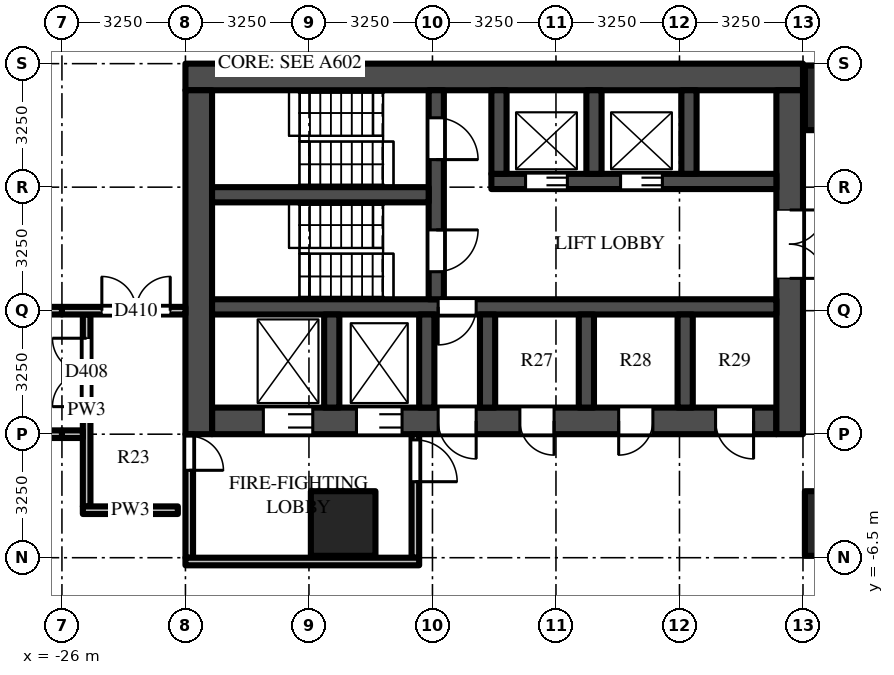
"""IFC4 building model, lengths in metres.
Left out: names, types, materials, properties, quantities, classifications, styles, units other than length and angle.
Written with IfcOpenShell. Run it as: python <this file> out.ifc"""

import sys

from ifc_helpers import new_model, si_unit, direction, frame, frame_2d, origin, origin_2d, place, context, subcontext, project, spatial, rectangle, extrude, source, transform, mapped, element, fill, save


model = new_model("IFC4")
c1 = context("Model", 3, precision=1e-05, world=origin(), true_north=direction((0.0, 1.0)))
c2 = subcontext(c1, "Body", "Model", "MODEL_VIEW")
j1 = project(units=[si_unit("LENGTHUNIT", "METRE"), si_unit("PLANEANGLEUNIT", "RADIAN")], contexts=[c1])
p1 = place(None, origin())
s1 = spatial("IfcSite", under=j1, at=p1, CompositionType="ELEMENT")
p2 = place(p1, origin())
s2 = spatial("IfcBuilding", under=s1, at=p2, CompositionType="ELEMENT")
p3 = place(p2, frame((0.0, 0.0, 8.0)))
s3 = spatial("IfcBuildingStorey", under=s2, at=p3, CompositionType="ELEMENT", Elevation=8.0)
m1 = source(origin(), c2, "Body", "SweptSolid", [
    extrude(rectangle(XDim=1.7, YDim=1.7, at=origin_2d()), origin(), (0.0, 0.0, 1.0), 6.0),
])
for number, where, z_axis, x_axis in (
    (1, (-5.6, 5.6, 0.0), (0.0, 0.0, 1.0), (1.0, 0.0, 0.0)),
    (2, (-5.6, -5.6, 0.0), (0.0, 0.0, 1.0), (1.0, 0.0, 0.0)),
    (3, (-18.6, -5.6, 0.0), (0.0, 0.0, 1.0), (1.0, 0.0, 0.0)),
):
    element("IfcColumn", number, at=place(p3, frame(where, z_axis=z_axis, x_axis=x_axis)), inside=s3, PredefinedType="COLUMN", context=c2, shape_type="MappedRepresentation", body=[
        mapped(m1, transform((0.0, 0.0, 0.0))),
    ])
m2 = source(origin(), c2, "Body", "SweptSolid", [
    extrude(rectangle(XDim=16.25, YDim=0.7, at=frame_2d((8.125, 0.0))), origin(), (0.0, 0.0, 1.0), 5.7),
])
p4 = place(p3, frame((-6.5, 6.15, 0.0), z_axis=(0.0, 0.0, 1.0), x_axis=(-1.0, 0.0, 0.0)))
e4 = element("IfcWall", 4, at=p4, inside=s3, PredefinedType="SHEAR", context=c2, shape_type="MappedRepresentation", body=[
    mapped(m2, transform((0.0, 0.0, 0.0))),
])
m3 = source(origin(), c2, "Body", "SweptSolid", [
    extrude(rectangle(XDim=14.85, YDim=0.7, at=frame_2d((7.425, 0.0))), origin(), (0.0, 0.0, 1.0), 5.7),
])
p5 = place(p3, frame((-7.2, -2.9, 0.0), z_axis=(0.0, 0.0, 1.0), x_axis=(-1.0, 0.0, 0.0)))
e5 = element("IfcWall", 5, at=p5, inside=s3, PredefinedType="SHEAR", context=c2, shape_type="MappedRepresentation", body=[
    mapped(m3, transform((0.0, 0.0, 0.0))),
])
m4 = source(origin(), c2, "Body", "SweptSolid", [
    extrude(rectangle(XDim=1.3, YDim=2.1, at=frame_2d((0.65, 1.05))), frame((0.0, 0.36, 0.0), z_axis=(0.0, -1.0, 0.0), x_axis=(1.0, 0.0, 0.0)), (0.0, 0.0, 1.0), 0.72),
])
p6 = place(p5, frame((12.2, 0.0, 0.0)))
e6 = element("IfcOpeningElement", 6, at=p6, cuts=e5, PredefinedType="OPENING", context=c2, shape_type="MappedRepresentation", body=[
    mapped(m4, transform((0.0, 0.0, 0.0))),
])
m5 = source(origin(), c2, "Body", "SweptSolid", [
    extrude(rectangle(XDim=1.2, YDim=2.1, at=frame_2d((0.6, 1.05))), frame((0.0, 0.36, 0.0), z_axis=(0.0, -1.0, 0.0), x_axis=(1.0, 0.0, 0.0)), (0.0, 0.0, 1.0), 0.72),
])
p7 = place(p5, frame((9.85, 0.0, 0.0)))
e7 = element("IfcOpeningElement", 7, at=p7, cuts=e5, PredefinedType="OPENING", context=c2, shape_type="MappedRepresentation", body=[
    mapped(m5, transform((0.0, 0.0, 0.0))),
])
m6 = source(origin(), c2, "Body", "SweptSolid", [
    extrude(rectangle(XDim=1.0, YDim=2.1, at=frame_2d((0.5, 1.05))), frame((0.0, 0.36, 0.0), z_axis=(0.0, -1.0, 0.0), x_axis=(1.0, 0.0, 0.0)), (0.0, 0.0, 1.0), 0.72),
])
p8 = place(p5, frame((7.9, 0.0, 0.0)))
e8 = element("IfcOpeningElement", 8, at=p8, cuts=e5, PredefinedType="OPENING", context=c2, shape_type="MappedRepresentation", body=[
    mapped(m6, transform((0.0, 0.0, 0.0))),
])
p9 = place(p5, frame((0.6, 0.0, 0.0)))
e9 = element("IfcOpeningElement", 9, at=p9, cuts=e5, PredefinedType="OPENING", context=c2, shape_type="MappedRepresentation", body=[
    mapped(m6, transform((0.0, 0.0, 0.0))),
])
m7 = source(origin(), c2, "Body", "SweptSolid", [
    extrude(rectangle(XDim=0.9, YDim=2.1, at=frame_2d((0.45, 1.05))), frame((0.0, 0.36, 0.0), z_axis=(0.0, -1.0, 0.0), x_axis=(1.0, 0.0, 0.0)), (0.0, 0.0, 1.0), 0.72),
])
p10 = place(p5, frame((3.25, 0.0, 0.0)))
e10 = element("IfcOpeningElement", 10, at=p10, cuts=e5, PredefinedType="OPENING", context=c2, shape_type="MappedRepresentation", body=[
    mapped(m7, transform((0.0, 0.0, 0.0))),
])
p11 = place(p5, frame((5.85, 0.0, 0.0)))
e11 = element("IfcOpeningElement", 11, at=p11, cuts=e5, PredefinedType="OPENING", context=c2, shape_type="MappedRepresentation", body=[
    mapped(m7, transform((0.0, 0.0, 0.0))),
])
m8 = source(origin(), c2, "Body", "SweptSolid", [
    extrude(rectangle(XDim=9.05, YDim=0.7, at=frame_2d((4.525, 0.0))), origin(), (0.0, 0.0, 1.0), 5.7),
])
p12 = place(p3, frame((-6.85, 5.8, 0.0), z_axis=(0.0, 0.0, 1.0), x_axis=(0.0, -1.0, 0.0)))
e12 = element("IfcWall", 12, at=p12, inside=s3, PredefinedType="SHEAR", context=c2, shape_type="MappedRepresentation", body=[
    mapped(m8, transform((0.0, 0.0, 0.0))),
])
m9 = source(origin(), c2, "Body", "SweptSolid", [
    extrude(rectangle(XDim=1.8, YDim=2.1, at=frame_2d((0.9, 1.05))), frame((0.0, 0.36, 0.0), z_axis=(0.0, -1.0, 0.0), x_axis=(1.0, 0.0, 0.0)), (0.0, 0.0, 1.0), 0.72),
])
p13 = place(p12, frame((3.15, 0.0, 0.0)))
e13 = element("IfcOpeningElement", 13, at=p13, cuts=e12, PredefinedType="OPENING", context=c2, shape_type="MappedRepresentation", body=[
    mapped(m9, transform((0.0, 0.0, 0.0))),
])
p14 = place(p3, frame((-22.4, 5.8, 0.0), z_axis=(0.0, 0.0, 1.0), x_axis=(0.0, -1.0, 0.0)))
e14 = element("IfcWall", 14, at=p14, inside=s3, PredefinedType="SHEAR", context=c2, shape_type="MappedRepresentation", body=[
    mapped(m8, transform((0.0, 0.0, 0.0))),
])
m10 = source(origin(), c2, "Body", "SweptSolid", [
    extrude(rectangle(XDim=7.5, YDim=0.4, at=frame_2d((3.75, 0.0))), origin(), (0.0, 0.0, 1.0), 5.7),
])
p15 = place(p3, frame((-7.2, 3.4, 0.0), z_axis=(0.0, 0.0, 1.0), x_axis=(-1.0, 0.0, 0.0)))
e15 = element("IfcWall", 15, at=p15, inside=s3, PredefinedType="SHEAR", context=c2, shape_type="MappedRepresentation", body=[
    mapped(m10, transform((0.0, 0.0, 0.0))),
])
m11 = source(origin(), c2, "Body", "SweptSolid", [
    extrude(rectangle(XDim=1.1, YDim=2.1, at=frame_2d((0.55, 1.05))), frame((0.0, 0.21, 0.0), z_axis=(0.0, -1.0, 0.0), x_axis=(1.0, 0.0, 0.0)), (0.0, 0.0, 1.0), 0.42),
])
p16 = place(p15, frame((3.0, 0.0, 0.0)))
e16 = element("IfcOpeningElement", 16, at=p16, cuts=e15, PredefinedType="OPENING", context=c2, shape_type="MappedRepresentation", body=[
    mapped(m11, transform((0.0, 0.0, 0.0))),
])
p17 = place(p15, frame((5.5, 0.0, 0.0)))
e17 = element("IfcOpeningElement", 17, at=p17, cuts=e15, PredefinedType="OPENING", context=c2, shape_type="MappedRepresentation", body=[
    mapped(m11, transform((0.0, 0.0, 0.0))),
])
m12 = source(origin(), c2, "Body", "SweptSolid", [
    extrude(rectangle(XDim=14.85, YDim=0.4, at=frame_2d((7.425, 0.0))), origin(), (0.0, 0.0, 1.0), 5.7),
])
p18 = place(p3, frame((-7.2, 0.1, 0.0), z_axis=(0.0, 0.0, 1.0), x_axis=(-1.0, 0.0, 0.0)))
e18 = element("IfcWall", 18, at=p18, inside=s3, PredefinedType="SHEAR", context=c2, shape_type="MappedRepresentation", body=[
    mapped(m12, transform((0.0, 0.0, 0.0))),
])
m13 = source(origin(), c2, "Body", "SweptSolid", [
    extrude(rectangle(XDim=1.0, YDim=2.1, at=frame_2d((0.5, 1.05))), frame((0.0, 0.21, 0.0), z_axis=(0.0, -1.0, 0.0), x_axis=(1.0, 0.0, 0.0)), (0.0, 0.0, 1.0), 0.42),
])
p19 = place(p18, frame((7.9, 0.0, 0.0)))
e19 = element("IfcOpeningElement", 19, at=p19, cuts=e18, PredefinedType="OPENING", context=c2, shape_type="MappedRepresentation", body=[
    mapped(m13, transform((0.0, 0.0, 0.0))),
])
m14 = source(origin(), c2, "Body", "SweptSolid", [
    extrude(rectangle(XDim=5.5, YDim=0.4, at=frame_2d((2.75, 0.0))), origin(), (0.0, 0.0, 1.0), 5.7),
])
p20 = place(p3, frame((-16.15, 5.8, 0.0), z_axis=(0.0, 0.0, 1.0), x_axis=(0.0, -1.0, 0.0)))
e20 = element("IfcWall", 20, at=p20, inside=s3, PredefinedType="SHEAR", context=c2, shape_type="MappedRepresentation", body=[
    mapped(m14, transform((0.0, 0.0, 0.0))),
])
p21 = place(p20, frame((0.725, 0.0, 0.0)))
e21 = element("IfcOpeningElement", 21, at=p21, cuts=e20, PredefinedType="OPENING", context=c2, shape_type="MappedRepresentation", body=[
    mapped(m11, transform((0.0, 0.0, 0.0))),
])
p22 = place(p20, frame((3.675, 0.0, 0.0)))
e22 = element("IfcOpeningElement", 22, at=p22, cuts=e20, PredefinedType="OPENING", context=c2, shape_type="MappedRepresentation", body=[
    mapped(m11, transform((0.0, 0.0, 0.0))),
])
m15 = source(origin(), c2, "Body", "SweptSolid", [
    extrude(rectangle(XDim=5.7, YDim=0.4, at=frame_2d((2.85, 0.0))), origin(), (0.0, 0.0, 1.0), 5.7),
])
p23 = place(p3, frame((-16.35, 3.05, 0.0), z_axis=(0.0, 0.0, 1.0), x_axis=(-1.0, 0.0, 0.0)))
e23 = element("IfcWall", 23, at=p23, inside=s3, PredefinedType="SHEAR", context=c2, shape_type="MappedRepresentation", body=[
    mapped(m15, transform((0.0, 0.0, 0.0))),
])
m16 = source(origin(), c2, "Body", "SweptSolid", [
    extrude(rectangle(XDim=2.2, YDim=0.4, at=frame_2d((1.1, 0.0))), origin(), (0.0, 0.0, 1.0), 5.7),
])
for number, where, z_axis, x_axis in (
    (24, (-9.5, 5.8, 0.0), (0.0, 0.0, 1.0), (0.0, -1.0, 0.0)),
    (25, (-12.0, 5.8, 0.0), (0.0, 0.0, 1.0), (0.0, -1.0, 0.0)),
    (26, (-14.5, 5.8, 0.0), (0.0, 0.0, 1.0), (0.0, -1.0, 0.0)),
):
    element("IfcWall", number, at=place(p3, frame(where, z_axis=z_axis, x_axis=x_axis)), inside=s3, PredefinedType="SHEAR", context=c2, shape_type="MappedRepresentation", body=[
        mapped(m16, transform((0.0, 0.0, 0.0))),
    ])
m17 = source(origin(), c2, "Body", "SweptSolid", [
    extrude(rectangle(XDim=2.45, YDim=0.4, at=frame_2d((1.225, 0.0))), origin(), (0.0, 0.0, 1.0), 5.7),
])
for number, where, z_axis, x_axis in (
    (27, (-9.6, -0.1, 0.0), (0.0, 0.0, 1.0), (0.0, -1.0, 0.0)),
    (28, (-12.2, -0.1, 0.0), (0.0, 0.0, 1.0), (0.0, -1.0, 0.0)),
    (29, (-14.8, -0.1, 0.0), (0.0, 0.0, 1.0), (0.0, -1.0, 0.0)),
    (30, (-16.4, -0.1, 0.0), (0.0, 0.0, 1.0), (0.0, -1.0, 0.0)),
    (31, (-18.9, -0.1, 0.0), (0.0, 0.0, 1.0), (0.0, -1.0, 0.0)),
):
    element("IfcWall", number, at=place(p3, frame(where, z_axis=z_axis, x_axis=x_axis)), inside=s3, PredefinedType="SHEAR", context=c2, shape_type="MappedRepresentation", body=[
        mapped(m17, transform((0.0, 0.0, 0.0))),
    ])
m18 = source(origin(), c2, "Body", "SweptSolid", [
    extrude(rectangle(XDim=3.25, YDim=0.2, at=frame_2d((1.625, 0.0))), origin(), (0.0, 0.0, 1.0), 5.7),
])
p24 = place(p3, frame((-16.7, -3.25, 0.0), z_axis=(0.0, 0.0, 1.0), x_axis=(0.0, -1.0, 0.0)))
e32 = element("IfcWall", 32, at=p24, inside=s3, PredefinedType="PARTITIONING", context=c2, shape_type="MappedRepresentation", body=[
    mapped(m18, transform((0.0, 0.0, 0.0))),
])
m19 = source(origin(), c2, "Body", "SweptSolid", [
    extrude(rectangle(XDim=1.1, YDim=2.1, at=frame_2d((0.55, 1.05))), frame((0.0, 0.11, 0.0), z_axis=(0.0, -1.0, 0.0), x_axis=(1.0, 0.0, 0.0)), (0.0, 0.0, 1.0), 0.22),
])
p25 = place(p24, frame((0.15, 0.0, 0.0)))
e33 = element("IfcOpeningElement", 33, at=p25, cuts=e32, PredefinedType="OPENING", context=c2, shape_type="MappedRepresentation", body=[
    mapped(m19, transform((0.0, 0.0, 0.0))),
])
p26 = place(p3, frame((-22.65, -3.25, 0.0), z_axis=(0.0, 0.0, 1.0), x_axis=(0.0, -1.0, 0.0)))
e34 = element("IfcWall", 34, at=p26, inside=s3, PredefinedType="PARTITIONING", context=c2, shape_type="MappedRepresentation", body=[
    mapped(m18, transform((0.0, 0.0, 0.0))),
])
m20 = source(origin(), c2, "Body", "SweptSolid", [
    extrude(rectangle(XDim=0.9, YDim=2.1, at=frame_2d((0.45, 1.05))), frame((0.0, 0.11, 0.0), z_axis=(0.0, -1.0, 0.0), x_axis=(1.0, 0.0, 0.0)), (0.0, 0.0, 1.0), 0.22),
])
p27 = place(p26, frame((0.05, 0.0, 0.0)))
e35 = element("IfcOpeningElement", 35, at=p27, cuts=e34, PredefinedType="OPENING", context=c2, shape_type="MappedRepresentation", body=[
    mapped(m20, transform((0.0, 0.0, 0.0))),
])
m21 = source(origin(), c2, "Body", "SweptSolid", [
    extrude(rectangle(XDim=6.15, YDim=0.2, at=frame_2d((3.075, 0.0))), origin(), (0.0, 0.0, 1.0), 5.7),
])
p28 = place(p3, frame((-16.6, -6.6, 0.0), z_axis=(0.0, 0.0, 1.0), x_axis=(-1.0, 0.0, 0.0)))
e36 = element("IfcWall", 36, at=p28, inside=s3, PredefinedType="PARTITIONING", context=c2, shape_type="MappedRepresentation", body=[
    mapped(m21, transform((0.0, 0.0, 0.0))),
])
m22 = source(origin(), c2, "Body", "SweptSolid", [
    extrude(rectangle(XDim=5.05, YDim=0.2, at=frame_2d((2.525, 0.0))), origin(), (0.0, 0.0, 1.0), 5.077),
])
p29 = place(p3, frame((-25.35, -5.15, 0.0), z_axis=(0.0, 0.0, 1.0), x_axis=(0.0, 1.0, 0.0)))
e37 = element("IfcWall", 37, at=p29, inside=s3, PredefinedType="PARTITIONING", context=c2, shape_type="MappedRepresentation", body=[
    mapped(m22, transform((0.0, 0.0, 0.0))),
])
m23 = source(origin(), c2, "Body", "SweptSolid", [
    extrude(rectangle(XDim=1.8, YDim=2.1, at=frame_2d((0.9, 1.05))), frame((0.0, 0.11, 0.0), z_axis=(0.0, -1.0, 0.0), x_axis=(1.0, 0.0, 0.0)), (0.0, 0.0, 1.0), 0.22),
])
p30 = place(p29, frame((2.625, 0.0, 0.0)))
e38 = element("IfcOpeningElement", 38, at=p30, cuts=e37, PredefinedType="OPENING", context=c2, shape_type="MappedRepresentation", body=[
    mapped(m23, transform((0.0, 0.0, 0.0))),
])
m24 = source(origin(), c2, "Body", "SweptSolid", [
    extrude(rectangle(XDim=2.5, YDim=0.2, at=frame_2d((1.25, 0.0))), origin(), (0.0, 0.0, 1.0), 5.7),
])
p31 = place(p3, frame((-25.45, -5.25, 0.0), z_axis=(0.0, 0.0, 1.0), x_axis=(1.0, 0.0, 0.0)))
e39 = element("IfcWall", 39, at=p31, inside=s3, PredefinedType="PARTITIONING", context=c2, shape_type="MappedRepresentation", body=[
    mapped(m24, transform((0.0, 0.0, 0.0))),
])
m25 = source(origin(), c2, "Body", "SweptSolid", [
    extrude(rectangle(XDim=0.55, YDim=0.2, at=frame_2d((0.275, 0.0))), origin(), (0.0, 0.0, 1.0), 5.7),
])
p32 = place(p3, frame((-26.0, -3.25, 0.0), z_axis=(0.0, 0.0, 1.0), x_axis=(1.0, 0.0, 0.0)))
e40 = element("IfcWall", 40, at=p32, inside=s3, PredefinedType="PARTITIONING", context=c2, shape_type="MappedRepresentation", body=[
    mapped(m25, transform((0.0, 0.0, 0.0))),
])
m26 = source(origin(), c2, "Body", "SweptSolid", [
    extrude(rectangle(XDim=6.5, YDim=0.2, at=frame_2d((3.25, 0.0))), origin(), (0.0, 0.0, 1.0), 4.918),
])
p33 = place(p3, frame((-26.0, -3.25, 0.0), z_axis=(0.0, 0.0, 1.0), x_axis=(-1.0, 0.0, 0.0)))
e41 = element("IfcWall", 41, at=p33, inside=s3, PredefinedType="PARTITIONING", context=c2, shape_type="MappedRepresentation", body=[
    mapped(m26, transform((0.0, 0.0, 0.0))),
])
m27 = source(origin(), c2, "Body", "SweptSolid", [
    extrude(rectangle(XDim=3.25, YDim=0.2, at=frame_2d((1.625, 0.0))), origin(), (0.0, 0.0, 1.0), 5.077),
])
p34 = place(p3, frame((-26.0, 0.0, 0.0), z_axis=(0.0, 0.0, 1.0), x_axis=(1.0, 0.0, 0.0)))
e42 = element("IfcWall", 42, at=p34, inside=s3, PredefinedType="PARTITIONING", context=c2, shape_type="MappedRepresentation", body=[
    mapped(m27, transform((0.0, 0.0, 0.0))),
])
p35 = place(p34, frame((1.05, 0.0, 0.0)))
e43 = element("IfcOpeningElement", 43, at=p35, cuts=e42, PredefinedType="OPENING", context=c2, shape_type="MappedRepresentation", body=[
    mapped(m23, transform((0.0, 0.0, 0.0))),
])
p36 = place(p3, frame((-32.5, 0.0, 0.0), z_axis=(0.0, 0.0, 1.0), x_axis=(1.0, 0.0, 0.0)))
e44 = element("IfcWall", 44, at=p36, inside=s3, PredefinedType="PARTITIONING", context=c2, shape_type="MappedRepresentation", body=[
    mapped(m26, transform((0.0, 0.0, 0.0))),
])
m28 = source(origin(), c2, "Body", "SweptSolid", [
    extrude(rectangle(XDim=1.1, YDim=2.1, at=frame_2d((0.55, 1.05))), frame((0.0, 0.025, 0.0), z_axis=(0.0, -1.0, 0.0), x_axis=(1.0, 0.0, 0.0)), (0.0, 0.0, 1.0), 0.05),
])
p37 = place(p16, origin())
e45 = element("IfcDoor", 45, at=p37, inside=s3, OperationType="DOUBLE_DOOR_SLIDING", PredefinedType="DOOR", context=c2, shape_type="MappedRepresentation", body=[
    mapped(m28, transform((0.0, 0.0, 0.0))),
])
fill(e16, e45)
p38 = place(p17, origin())
e46 = element("IfcDoor", 46, at=p38, inside=s3, OperationType="DOUBLE_DOOR_SLIDING", PredefinedType="DOOR", context=c2, shape_type="MappedRepresentation", body=[
    mapped(m28, transform((0.0, 0.0, 0.0))),
])
fill(e17, e46)
m29 = source(origin(), c2, "Body", "SweptSolid", [
    extrude(rectangle(XDim=1.3, YDim=2.1, at=frame_2d((0.65, 1.05))), frame((0.0, -0.275, 0.0), z_axis=(0.0, -1.0, 0.0), x_axis=(1.0, 0.0, 0.0)), (0.0, 0.0, 1.0), 0.05),
])
p39 = place(p6, origin())
e47 = element("IfcDoor", 47, at=p39, inside=s3, OperationType="DOUBLE_DOOR_SLIDING", PredefinedType="DOOR", context=c2, shape_type="MappedRepresentation", body=[
    mapped(m29, transform((0.0, 0.0, 0.0))),
])
fill(e6, e47)
m30 = source(origin(), c2, "Body", "SweptSolid", [
    extrude(rectangle(XDim=1.2, YDim=2.1, at=frame_2d((0.6, 1.05))), frame((0.0, -0.275, 0.0), z_axis=(0.0, -1.0, 0.0), x_axis=(1.0, 0.0, 0.0)), (0.0, 0.0, 1.0), 0.05),
])
p40 = place(p7, origin())
e48 = element("IfcDoor", 48, at=p40, inside=s3, OperationType="DOUBLE_DOOR_SLIDING", PredefinedType="DOOR", context=c2, shape_type="MappedRepresentation", body=[
    mapped(m30, transform((0.0, 0.0, 0.0))),
])
fill(e7, e48)
m31 = source(origin(), c2, "Body", "SweptSolid", [
    extrude(rectangle(XDim=1.8, YDim=2.1, at=frame_2d((0.9, 1.05))), frame((0.0, -0.275, 0.0), z_axis=(0.0, -1.0, 0.0), x_axis=(1.0, 0.0, 0.0)), (0.0, 0.0, 1.0), 0.05),
])
p41 = place(p13, origin())
e49 = element("IfcDoor", 49, at=p41, inside=s3, OperationType="DOUBLE_DOOR_SINGLE_SWING", PredefinedType="DOOR", context=c2, shape_type="MappedRepresentation", body=[
    mapped(m31, transform((0.0, 0.0, 0.0))),
])
fill(e13, e49)
p42 = place(p21, origin())
e50 = element("IfcDoor", 50, at=p42, inside=s3, OperationType="SINGLE_SWING_RIGHT", PredefinedType="DOOR", context=c2, shape_type="MappedRepresentation", body=[
    mapped(m28, transform((0.0, 0.0, 0.0))),
])
fill(e21, e50)
p43 = place(p22, origin())
e51 = element("IfcDoor", 51, at=p43, inside=s3, OperationType="SINGLE_SWING_LEFT", PredefinedType="DOOR", context=c2, shape_type="MappedRepresentation", body=[
    mapped(m28, transform((0.0, 0.0, 0.0))),
])
fill(e22, e51)
m32 = source(origin(), c2, "Body", "SweptSolid", [
    extrude(rectangle(XDim=1.0, YDim=2.1, at=frame_2d((0.5, 1.05))), frame((0.0, 0.025, 0.0), z_axis=(0.0, -1.0, 0.0), x_axis=(1.0, 0.0, 0.0)), (0.0, 0.0, 1.0), 0.05),
])
p44 = place(p19, origin())
e52 = element("IfcDoor", 52, at=p44, inside=s3, OperationType="SINGLE_SWING_RIGHT", PredefinedType="DOOR", context=c2, shape_type="MappedRepresentation", body=[
    mapped(m32, transform((0.0, 0.0, 0.0))),
])
fill(e19, e52)
m33 = source(origin(), c2, "Body", "SweptSolid", [
    extrude(rectangle(XDim=1.0, YDim=2.1, at=frame_2d((0.5, 1.05))), frame((0.0, -0.275, 0.0), z_axis=(0.0, -1.0, 0.0), x_axis=(1.0, 0.0, 0.0)), (0.0, 0.0, 1.0), 0.05),
])
p45 = place(p8, origin())
e53 = element("IfcDoor", 53, at=p45, inside=s3, OperationType="SINGLE_SWING_LEFT", PredefinedType="DOOR", context=c2, shape_type="MappedRepresentation", body=[
    mapped(m33, transform((0.0, 0.0, 0.0))),
])
fill(e8, e53)
p46 = place(p25, origin())
e54 = element("IfcDoor", 54, at=p46, inside=s3, OperationType="SINGLE_SWING_RIGHT", PredefinedType="DOOR", context=c2, shape_type="MappedRepresentation", body=[
    mapped(m28, transform((0.0, 0.0, 0.0))),
])
fill(e33, e54)
m34 = source(origin(), c2, "Body", "SweptSolid", [
    extrude(rectangle(XDim=0.9, YDim=2.1, at=frame_2d((0.45, 1.05))), frame((0.0, 0.025, 0.0), z_axis=(0.0, -1.0, 0.0), x_axis=(1.0, 0.0, 0.0)), (0.0, 0.0, 1.0), 0.05),
])
p47 = place(p27, origin())
e55 = element("IfcDoor", 55, at=p47, inside=s3, OperationType="SINGLE_SWING_RIGHT", PredefinedType="DOOR", context=c2, shape_type="MappedRepresentation", body=[
    mapped(m34, transform((0.0, 0.0, 0.0))),
])
fill(e35, e55)
p48 = place(p9, origin())
e56 = element("IfcDoor", 56, at=p48, inside=s3, OperationType="SINGLE_SWING_LEFT", PredefinedType="DOOR", context=c2, shape_type="MappedRepresentation", body=[
    mapped(m33, transform((0.0, 0.0, 0.0))),
])
fill(e9, e56)
m35 = source(origin(), c2, "Body", "SweptSolid", [
    extrude(rectangle(XDim=0.9, YDim=2.1, at=frame_2d((0.45, 1.05))), frame((0.0, -0.275, 0.0), z_axis=(0.0, -1.0, 0.0), x_axis=(1.0, 0.0, 0.0)), (0.0, 0.0, 1.0), 0.05),
])
p49 = place(p10, origin())
e57 = element("IfcDoor", 57, at=p49, inside=s3, OperationType="SINGLE_SWING_RIGHT", PredefinedType="DOOR", context=c2, shape_type="MappedRepresentation", body=[
    mapped(m35, transform((0.0, 0.0, 0.0))),
])
fill(e10, e57)
p50 = place(p11, origin())
e58 = element("IfcDoor", 58, at=p50, inside=s3, OperationType="SINGLE_SWING_LEFT", PredefinedType="DOOR", context=c2, shape_type="MappedRepresentation", body=[
    mapped(m35, transform((0.0, 0.0, 0.0))),
])
fill(e11, e58)
m36 = source(origin(), c2, "Body", "SweptSolid", [
    extrude(rectangle(XDim=1.8, YDim=2.1, at=frame_2d((0.9, 1.05))), frame((0.0, 0.025, 0.0), z_axis=(0.0, -1.0, 0.0), x_axis=(1.0, 0.0, 0.0)), (0.0, 0.0, 1.0), 0.05),
])
p51 = place(p30, origin())
e59 = element("IfcDoor", 59, at=p51, inside=s3, OperationType="DOUBLE_DOOR_SINGLE_SWING", PredefinedType="DOOR", context=c2, shape_type="MappedRepresentation", body=[
    mapped(m36, transform((0.0, 0.0, 0.0))),
])
fill(e38, e59)
p52 = place(p35, origin())
e60 = element("IfcDoor", 60, at=p52, inside=s3, OperationType="DOUBLE_DOOR_SINGLE_SWING", PredefinedType="DOOR", context=c2, shape_type="MappedRepresentation", body=[
    mapped(m36, transform((0.0, 0.0, 0.0))),
])
fill(e43, e60)
save(model, sys.argv[1])
